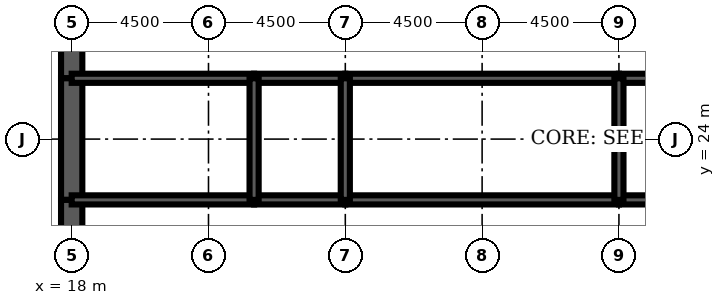
"""IFC4 building model, lengths in metres.
Left out: names, types, materials, properties, quantities, classifications, styles, units other than length and angle.
Written with IfcOpenShell. Run it as: python <this file> out.ifc"""

import sys

from ifc_helpers import new_model, si_unit, direction, frame, frame_2d, origin, place, context, subcontext, project, spatial, rectangle, extrude, element, fill, save


model = new_model("IFC4")
c1 = context("Model", 3, precision=1e-05, world=origin(), true_north=direction((0.0, 1.0)))
c2 = subcontext(c1, "Body", "Model", "MODEL_VIEW")
j1 = project(units=[si_unit("LENGTHUNIT", "METRE"), si_unit("PLANEANGLEUNIT", "RADIAN")], contexts=[c1])
p1 = place(None, origin())
s1 = spatial("IfcSite", under=j1, at=p1, CompositionType="ELEMENT")
p2 = place(p1, origin())
s2 = spatial("IfcBuilding", under=s1, at=p2, CompositionType="ELEMENT")
p3 = place(p2, frame((0.0, 0.0, 317.3)))
s3 = spatial("IfcBuildingStorey", under=s2, at=p3, CompositionType="ELEMENT", Elevation=317.3)
p4 = place(p3, frame((18.0, 28.8, 0.0), z_axis=(0.0, 0.0, 1.0), x_axis=(0.0, -1.0, 0.0)))
e1 = element("IfcWall", 1, at=p4, inside=s3, PredefinedType="SHEAR", context=c2, shape_type="SweptSolid", body=[
    extrude(rectangle(XDim=2.8, YDim=0.7, at=frame_2d((1.4, 0.0))), origin(), (0.0, 0.0, 1.0), 4.2),
])
p5 = place(p4, frame((0.4, 0.0, 0.0)))
e2 = element("IfcOpeningElement", 2, at=p5, cuts=e1, PredefinedType="OPENING", context=c2, shape_type="SweptSolid", body=[
    extrude(rectangle(XDim=1.8, YDim=2.1, at=frame_2d((0.9, 1.05))), frame((0.0, 0.36, 0.0), z_axis=(0.0, -1.0, 0.0), x_axis=(1.0, 0.0, 0.0)), (0.0, 0.0, 1.0), 0.72),
])
p6 = place(p3, frame((18.0, 26.0, 0.0), z_axis=(0.0, 0.0, 1.0), x_axis=(0.0, -1.0, 0.0)))
e3 = element("IfcWall", 3, at=p6, inside=s3, PredefinedType="SHEAR", context=c2, shape_type="SweptSolid", body=[
    extrude(rectangle(XDim=4.0, YDim=0.7, at=frame_2d((2.0, 0.0))), origin(), (0.0, 0.0, 1.0), 4.2),
])
p7 = place(p3, frame((18.0, 22.0, 0.0), z_axis=(0.0, 0.0, 1.0), x_axis=(0.0, -1.0, 0.0)))
e4 = element("IfcWall", 4, at=p7, inside=s3, PredefinedType="SHEAR", context=c2, shape_type="SweptSolid", body=[
    extrude(rectangle(XDim=2.8, YDim=0.7, at=frame_2d((1.4, 0.0))), origin(), (0.0, 0.0, 1.0), 4.2),
])
p8 = place(p7, frame((0.6, 0.0, 0.0)))
e5 = element("IfcOpeningElement", 5, at=p8, cuts=e4, PredefinedType="OPENING", context=c2, shape_type="SweptSolid", body=[
    extrude(rectangle(XDim=1.8, YDim=2.1, at=frame_2d((0.9, 1.05))), frame((0.0, 0.36, 0.0), z_axis=(0.0, -1.0, 0.0), x_axis=(1.0, 0.0, 0.0)), (0.0, 0.0, 1.0), 0.72),
])
p9 = place(p3, frame((18.0, 22.0, 0.0), z_axis=(0.0, 0.0, 1.0), x_axis=(1.0, 0.0, 0.0)))
e6 = element("IfcWall", 6, at=p9, inside=s3, PredefinedType="SOLIDWALL", context=c2, shape_type="SweptSolid", body=[
    extrude(rectangle(XDim=6.0, YDim=0.3, at=frame_2d((3.0, 0.0))), origin(), (0.0, 0.0, 1.0), 4.2),
])
p10 = place(p9, frame((4.4, 0.0, 0.0)))
e7 = element("IfcOpeningElement", 7, at=p10, cuts=e6, PredefinedType="OPENING", context=c2, shape_type="SweptSolid", body=[
    extrude(rectangle(XDim=1.0, YDim=2.1, at=frame_2d((0.5, 1.05))), frame((0.0, 0.16, 0.0), z_axis=(0.0, -1.0, 0.0), x_axis=(1.0, 0.0, 0.0)), (0.0, 0.0, 1.0), 0.32),
])
p11 = place(p9, frame((0.9, 0.0, 0.0)))
e8 = element("IfcOpeningElement", 8, at=p11, cuts=e6, PredefinedType="OPENING", context=c2, shape_type="SweptSolid", body=[
    extrude(rectangle(XDim=1.0, YDim=2.1, at=frame_2d((0.5, 1.05))), frame((0.0, 0.16, 0.0), z_axis=(0.0, -1.0, 0.0), x_axis=(1.0, 0.0, 0.0)), (0.0, 0.0, 1.0), 0.32),
])
p12 = place(p3, frame((24.0, 22.0, 0.0), z_axis=(0.0, 0.0, 1.0), x_axis=(1.0, 0.0, 0.0)))
e9 = element("IfcWall", 9, at=p12, inside=s3, PredefinedType="SOLIDWALL", context=c2, shape_type="SweptSolid", body=[
    extrude(rectangle(XDim=3.0, YDim=0.3, at=frame_2d((1.5, 0.0))), origin(), (0.0, 0.0, 1.0), 4.2),
])
p13 = place(p12, frame((1.0, 0.0, 0.0)))
e10 = element("IfcOpeningElement", 10, at=p13, cuts=e9, PredefinedType="OPENING", context=c2, shape_type="SweptSolid", body=[
    extrude(rectangle(XDim=1.0, YDim=2.1, at=frame_2d((0.5, 1.05))), frame((0.0, 0.16, 0.0), z_axis=(0.0, -1.0, 0.0), x_axis=(1.0, 0.0, 0.0)), (0.0, 0.0, 1.0), 0.32),
])
p14 = place(p3, frame((27.0, 22.0, 0.0), z_axis=(0.0, 0.0, 1.0), x_axis=(1.0, 0.0, 0.0)))
e11 = element("IfcWall", 11, at=p14, inside=s3, PredefinedType="SOLIDWALL", context=c2, shape_type="SweptSolid", body=[
    extrude(rectangle(XDim=9.0, YDim=0.3, at=frame_2d((4.5, 0.0))), origin(), (0.0, 0.0, 1.0), 4.2),
])
p15 = place(p14, frame((4.0, 0.0, 0.0)))
e12 = element("IfcOpeningElement", 12, at=p15, cuts=e11, PredefinedType="OPENING", context=c2, shape_type="SweptSolid", body=[
    extrude(rectangle(XDim=1.0, YDim=2.1, at=frame_2d((0.5, 1.05))), frame((0.0, 0.16, 0.0), z_axis=(0.0, -1.0, 0.0), x_axis=(1.0, 0.0, 0.0)), (0.0, 0.0, 1.0), 0.32),
])
p16 = place(p3, frame((36.0, 22.0, 0.0), z_axis=(0.0, 0.0, 1.0), x_axis=(1.0, 0.0, 0.0)))
e13 = element("IfcWall", 13, at=p16, inside=s3, PredefinedType="SOLIDWALL", context=c2, shape_type="SweptSolid", body=[
    extrude(rectangle(XDim=9.0, YDim=0.3, at=frame_2d((4.5, 0.0))), origin(), (0.0, 0.0, 1.0), 4.2),
])
p17 = place(p16, frame((4.0, 0.0, 0.0)))
e14 = element("IfcOpeningElement", 14, at=p17, cuts=e13, PredefinedType="OPENING", context=c2, shape_type="SweptSolid", body=[
    extrude(rectangle(XDim=1.0, YDim=2.1, at=frame_2d((0.5, 1.05))), frame((0.0, 0.16, 0.0), z_axis=(0.0, -1.0, 0.0), x_axis=(1.0, 0.0, 0.0)), (0.0, 0.0, 1.0), 0.32),
])
p18 = place(p3, frame((18.0, 26.0, 0.0), z_axis=(0.0, 0.0, 1.0), x_axis=(1.0, 0.0, 0.0)))
e15 = element("IfcWall", 15, at=p18, inside=s3, PredefinedType="SOLIDWALL", context=c2, shape_type="SweptSolid", body=[
    extrude(rectangle(XDim=6.0, YDim=0.3, at=frame_2d((3.0, 0.0))), origin(), (0.0, 0.0, 1.0), 4.2),
])
p19 = place(p3, frame((24.0, 26.0, 0.0), z_axis=(0.0, 0.0, 1.0), x_axis=(1.0, 0.0, 0.0)))
e16 = element("IfcWall", 16, at=p19, inside=s3, PredefinedType="SOLIDWALL", context=c2, shape_type="SweptSolid", body=[
    extrude(rectangle(XDim=3.0, YDim=0.3, at=frame_2d((1.5, 0.0))), origin(), (0.0, 0.0, 1.0), 4.2),
])
for number, where, z_axis, x_axis in (
    (17, (27.0, 26.0, 0.0), (0.0, 0.0, 1.0), (1.0, 0.0, 0.0)),
    (18, (36.0, 26.0, 0.0), (0.0, 0.0, 1.0), (1.0, 0.0, 0.0)),
):
    element("IfcWall", number, at=place(p3, frame(where, z_axis=z_axis, x_axis=x_axis)), inside=s3, PredefinedType="SOLIDWALL", context=c2, shape_type="SweptSolid", body=[
        extrude(rectangle(XDim=9.0, YDim=0.3, at=frame_2d((4.5, 0.0))), origin(), (0.0, 0.0, 1.0), 4.2),
    ])
for number, where, z_axis, x_axis in (
    (19, (24.0, 22.0, 0.0), (0.0, 0.0, 1.0), (0.0, 1.0, 0.0)),
    (20, (27.0, 22.0, 0.0), (0.0, 0.0, 1.0), (0.0, 1.0, 0.0)),
    (21, (36.0, 22.0, 0.0), (0.0, 0.0, 1.0), (0.0, 1.0, 0.0)),
):
    element("IfcWall", number, at=place(p3, frame(where, z_axis=z_axis, x_axis=x_axis)), inside=s3, PredefinedType="SOLIDWALL", context=c2, shape_type="SweptSolid", body=[
        extrude(rectangle(XDim=4.0, YDim=0.3, at=frame_2d((2.0, 0.0))), origin(), (0.0, 0.0, 1.0), 4.2),
    ])
p20 = place(p3, frame((20.525, 22.15, 0.0), z_axis=(0.0, 0.0, 1.0), x_axis=(0.0, 1.0, 0.0)))
e22 = element("IfcWall", 22, at=p20, inside=s3, PredefinedType="PARTITIONING", context=c2, shape_type="SweptSolid", body=[
    extrude(rectangle(XDim=3.7, YDim=0.15, at=frame_2d((1.85, 0.0))), origin(), (0.0, 0.0, 1.0), 3.0),
])
p21 = place(p8, origin())
e23 = element("IfcDoor", 23, at=p21, inside=s3, OperationType="SINGLE_SWING_LEFT", PredefinedType="DOOR", context=c2, shape_type="SweptSolid", body=[
    extrude(rectangle(XDim=1.8, YDim=2.1, at=frame_2d((0.9, 1.05))), frame((0.0, 0.35, 0.0), z_axis=(0.0, -1.0, 0.0), x_axis=(1.0, 0.0, 0.0)), (0.0, 0.0, 1.0), 0.699),
])
fill(e5, e23)
p22 = place(p5, origin())
e24 = element("IfcDoor", 24, at=p22, inside=s3, OperationType="SINGLE_SWING_LEFT", PredefinedType="DOOR", context=c2, shape_type="SweptSolid", body=[
    extrude(rectangle(XDim=1.8, YDim=2.1, at=frame_2d((0.9, 1.05))), frame((0.0, 0.35, 0.0), z_axis=(0.0, -1.0, 0.0), x_axis=(1.0, 0.0, 0.0)), (0.0, 0.0, 1.0), 0.699),
])
fill(e2, e24)
p23 = place(p10, origin())
e25 = element("IfcDoor", 25, at=p23, inside=s3, OperationType="SINGLE_SWING_RIGHT", PredefinedType="DOOR", context=c2, shape_type="SweptSolid", body=[
    extrude(rectangle(XDim=1.0, YDim=2.1, at=frame_2d((0.5, 1.05))), frame((0.0, 0.025, 0.0), z_axis=(0.0, -1.0, 0.0), x_axis=(1.0, 0.0, 0.0)), (0.0, 0.0, 1.0), 0.05),
])
fill(e7, e25)
p24 = place(p13, origin())
e26 = element("IfcDoor", 26, at=p24, inside=s3, OperationType="SINGLE_SWING_LEFT", PredefinedType="DOOR", context=c2, shape_type="SweptSolid", body=[
    extrude(rectangle(XDim=1.0, YDim=2.1, at=frame_2d((0.5, 1.05))), frame((0.0, 0.025, 0.0), z_axis=(0.0, -1.0, 0.0), x_axis=(1.0, 0.0, 0.0)), (0.0, 0.0, 1.0), 0.05),
])
fill(e10, e26)
p25 = place(p15, origin())
e27 = element("IfcDoor", 27, at=p25, inside=s3, OperationType="SINGLE_SWING_LEFT", PredefinedType="DOOR", context=c2, shape_type="SweptSolid", body=[
    extrude(rectangle(XDim=1.0, YDim=2.1, at=frame_2d((0.5, 1.05))), frame((0.0, 0.025, 0.0), z_axis=(0.0, -1.0, 0.0), x_axis=(1.0, 0.0, 0.0)), (0.0, 0.0, 1.0), 0.05),
])
fill(e12, e27)
p26 = place(p11, origin())
e28 = element("IfcDoor", 28, at=p26, inside=s3, OperationType="SINGLE_SWING_LEFT", PredefinedType="DOOR", context=c2, shape_type="SweptSolid", body=[
    extrude(rectangle(XDim=1.0, YDim=2.1, at=frame_2d((0.5, 1.05))), frame((0.0, 0.025, 0.0), z_axis=(0.0, -1.0, 0.0), x_axis=(1.0, 0.0, 0.0)), (0.0, 0.0, 1.0), 0.05),
])
fill(e8, e28)
save(model, sys.argv[1])
